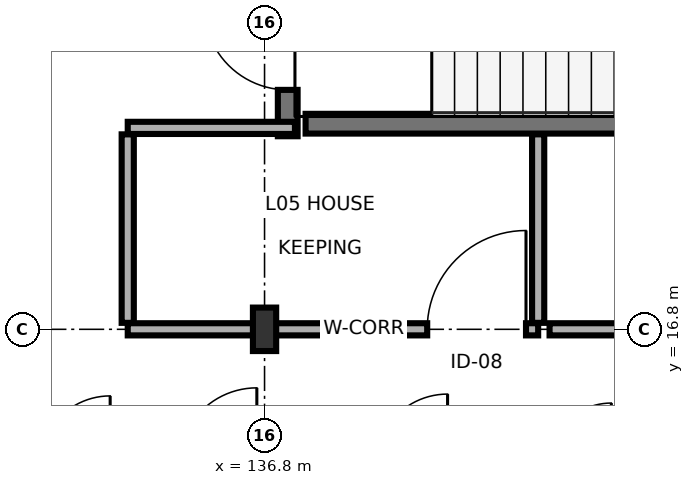
"""IFC4 building model, lengths in metres.
Left out: names, types, materials, properties, quantities, classifications, styles, units other than length and angle.
Written with IfcOpenShell. Run it as: python <this file> out.ifc"""

import sys

from ifc_helpers import new_model, si_unit, direction, frame, frame_2d, origin, origin_2d, place, context, subcontext, project, spatial, rectangle, i_section, extrude, element, fill, save


model = new_model("IFC4")
c1 = context("Model", 3, precision=1e-05, world=origin(), true_north=direction((0.0, 1.0)))
c2 = subcontext(c1, "Body", "Model", "MODEL_VIEW")
j1 = project(units=[si_unit("LENGTHUNIT", "METRE"), si_unit("PLANEANGLEUNIT", "RADIAN")], contexts=[c1])
p1 = place(None, origin())
s1 = spatial("IfcSite", under=j1, at=p1, CompositionType="ELEMENT")
p2 = place(p1, origin())
s2 = spatial("IfcBuilding", under=s1, at=p2, CompositionType="ELEMENT")
p3 = place(p2, frame((0.0, 0.0, 18.1)))
s3 = spatial("IfcBuildingStorey", under=s2, at=p3, CompositionType="ELEMENT", Elevation=18.1)
p4 = place(p3, frame((136.8, 16.8, 0.0), z_axis=(0.0, 0.0, 1.0), x_axis=(1.0, 0.0, 0.0)))
e1 = element("IfcColumn", 1, at=p4, inside=s3, PredefinedType="COLUMN", context=c2, shape_type="SweptSolid", body=[
    extrude(i_section(OverallWidth=0.306, OverallDepth=0.572, WebThickness=0.021, FlangeThickness=0.04, FilletRadius=0.027, at=origin_2d()), origin(), (0.0, 0.0, 1.0), 3.4),
])
p5 = place(p3, frame((137.105, 19.34, 0.0), z_axis=(0.0, 0.0, 1.0), x_axis=(0.0, 1.0, 0.0)))
e2 = element("IfcWall", 2, at=p5, inside=s3, PredefinedType="SHEAR", context=c2, shape_type="SweptSolid", body=[
    extrude(rectangle(XDim=4.27, YDim=0.26, at=frame_2d((2.135, 0.0))), origin(), (0.0, 0.0, 1.0), 3.21),
])
p6 = place(p5, frame((0.61, 0.0, 0.0)))
e3 = element("IfcOpeningElement", 3, at=p6, cuts=e2, PredefinedType="OPENING", context=c2, shape_type="SweptSolid", body=[
    extrude(rectangle(XDim=1.1, YDim=2.2, at=frame_2d((0.55, 1.1))), frame((0.0, 0.14, 0.0), z_axis=(0.0, -1.0, 0.0), x_axis=(1.0, 0.0, 0.0)), (0.0, 0.0, 1.0), 0.28),
])
p7 = place(p3, frame((137.34, 19.505, 0.0), z_axis=(0.0, 0.0, 1.0), x_axis=(1.0, 0.0, 0.0)))
e4 = element("IfcWall", 4, at=p7, inside=s3, PredefinedType="SHEAR", context=c2, shape_type="SweptSolid", body=[
    extrude(rectangle(XDim=8.52, YDim=0.26, at=frame_2d((4.26, 0.0))), origin(), (0.0, 0.0, 1.0), 3.21),
])
p8 = place(p3, frame((135.0, 16.8, 0.0), z_axis=(0.0, 0.0, 1.0), x_axis=(1.0, 0.0, 0.0)))
e5 = element("IfcWall", 5, at=p8, inside=s3, PredefinedType="PARTITIONING", context=c2, shape_type="SweptSolid", body=[
    extrude(rectangle(XDim=5.4, YDim=0.16, at=frame_2d((2.7, 0.0))), origin(), (0.0, 0.0, 1.0), 2.745),
])
p9 = place(p8, frame((3.94, 0.0, 0.0)))
e6 = element("IfcOpeningElement", 6, at=p9, cuts=e5, PredefinedType="OPENING", context=c2, shape_type="SweptSolid", body=[
    extrude(rectangle(XDim=1.3, YDim=2.2, at=frame_2d((0.65, 1.1))), frame((0.0, 0.09, 0.0), z_axis=(0.0, -1.0, 0.0), x_axis=(1.0, 0.0, 0.0)), (0.0, 0.0, 1.0), 0.18),
])
for number, where, z_axis, x_axis in (
    (7, (135.0, 16.885, 0.0), (0.0, 0.0, 1.0), (0.0, 1.0, 0.0)),
    (8, (140.4, 16.885, 0.0), (0.0, 0.0, 1.0), (0.0, 1.0, 0.0)),
):
    element("IfcWall", number, at=place(p3, frame(where, z_axis=z_axis, x_axis=x_axis)), inside=s3, PredefinedType="PARTITIONING", context=c2, shape_type="SweptSolid", body=[
        extrude(rectangle(XDim=2.48, YDim=0.16, at=frame_2d((1.24, 0.0))), origin(), (0.0, 0.0, 1.0), 2.745),
    ])
p10 = place(p3, frame((135.0, 19.45, 0.0), z_axis=(0.0, 0.0, 1.0), x_axis=(1.0, 0.0, 0.0)))
e9 = element("IfcWall", 9, at=p10, inside=s3, PredefinedType="PARTITIONING", context=c2, shape_type="SweptSolid", body=[
    extrude(rectangle(XDim=2.2, YDim=0.16, at=frame_2d((1.1, 0.0))), origin(), (0.0, 0.0, 1.0), 2.745),
])
p11 = place(p3, frame((140.55, 16.8, 0.0), z_axis=(0.0, 0.0, 1.0), x_axis=(1.0, 0.0, 0.0)))
e10 = element("IfcWall", 10, at=p11, inside=s3, PredefinedType="PARTITIONING", context=c2, shape_type="SweptSolid", body=[
    extrude(rectangle(XDim=5.65, YDim=0.16, at=frame_2d((2.825, 0.0))), origin(), (0.0, 0.0, 1.0), 2.745),
])
p12 = place(p11, frame((2.175, 0.0, 0.0)))
e11 = element("IfcOpeningElement", 11, at=p12, cuts=e10, PredefinedType="OPENING", context=c2, shape_type="SweptSolid", body=[
    extrude(rectangle(XDim=1.3, YDim=2.2, at=frame_2d((0.65, 1.1))), frame((0.0, 0.09, 0.0), z_axis=(0.0, -1.0, 0.0), x_axis=(1.0, 0.0, 0.0)), (0.0, 0.0, 1.0), 0.18),
])
p13 = place(p6, origin())
e12 = element("IfcDoor", 12, at=p13, inside=s3, OperationType="SINGLE_SWING_RIGHT", PredefinedType="DOOR", context=c2, shape_type="SweptSolid", body=[
    extrude(rectangle(XDim=1.1, YDim=2.2, at=frame_2d((0.55, 1.1))), frame((0.0, 0.025, 0.0), z_axis=(0.0, -1.0, 0.0), x_axis=(1.0, 0.0, 0.0)), (0.0, 0.0, 1.0), 0.05),
])
fill(e3, e12)
p14 = place(p9, origin())
e13 = element("IfcDoor", 13, at=p14, inside=s3, OperationType="SINGLE_SWING_RIGHT", PredefinedType="DOOR", context=c2, shape_type="SweptSolid", body=[
    extrude(rectangle(XDim=1.3, YDim=2.2, at=frame_2d((0.65, 1.1))), frame((0.0, 0.025, 0.0), z_axis=(0.0, -1.0, 0.0), x_axis=(1.0, 0.0, 0.0)), (0.0, 0.0, 1.0), 0.05),
])
fill(e6, e13)
save(model, sys.argv[1])
